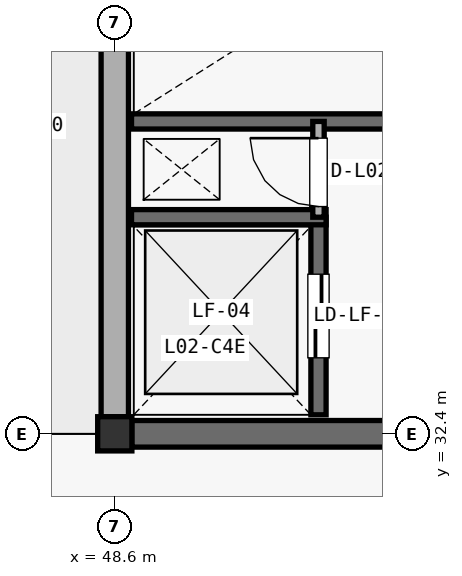
"""IFC4 building model, lengths in metres.
Left out: names, types, materials, properties, quantities, classifications, styles, units other than length and angle.
Written with IfcOpenShell. Run it as: python <this file> out.ifc"""

import sys

from ifc_helpers import new_model, si_unit, direction, frame, frame_2d, origin, origin_2d, place, context, subcontext, project, spatial, rectangle, extrude, element, fill, save


model = new_model("IFC4")
c1 = context("Model", 3, precision=1e-05, world=origin(), true_north=direction((0.0, 1.0)))
c2 = subcontext(c1, "Body", "Model", "MODEL_VIEW")
j1 = project(units=[si_unit("LENGTHUNIT", "METRE"), si_unit("PLANEANGLEUNIT", "RADIAN")], contexts=[c1])
p1 = place(None, origin())
s1 = spatial("IfcSite", under=j1, at=p1, CompositionType="ELEMENT")
p2 = place(p1, origin())
s2 = spatial("IfcBuilding", under=s1, at=p2, CompositionType="ELEMENT")
p3 = place(p2, frame((0.0, 0.0, 9.69)))
s3 = spatial("IfcBuildingStorey", under=s2, at=p3, CompositionType="ELEMENT", Elevation=9.69)
p4 = place(p3, frame((48.6, 32.4, 0.0), z_axis=(0.0, 0.0, 1.0), x_axis=(1.0, 0.0, 0.0)))
e1 = element("IfcColumn", 1, at=p4, inside=s3, PredefinedType="COLUMN", context=c2, shape_type="SweptSolid", body=[
    extrude(rectangle(XDim=0.45, YDim=0.45, at=origin_2d()), origin(), (0.0, 0.0, 1.0), 4.42),
])
p5 = place(p3, frame((48.6, 32.623, 0.0), z_axis=(0.0, 0.0, 1.0), x_axis=(0.0, 1.0, 0.0)))
e2 = element("IfcWall", 2, at=p5, inside=s3, PredefinedType="STANDARD", context=c2, shape_type="SweptSolid", body=[
    extrude(rectangle(XDim=7.654, YDim=0.36, at=frame_2d((3.827, 0.0))), origin(), (0.0, 0.0, 1.0), 3.682),
])
p6 = place(p3, frame((48.823, 32.4, 0.0), z_axis=(0.0, 0.0, 1.0), x_axis=(1.0, 0.0, 0.0)))
e3 = element("IfcWall", 3, at=p6, inside=s3, PredefinedType="SHEAR", context=c2, shape_type="SweptSolid", body=[
    extrude(rectangle(XDim=7.654, YDim=0.35, at=frame_2d((3.827, 0.0))), origin(), (0.0, 0.0, 1.0), 4.142),
])
p7 = place(p6, frame((4.427, 0.0, 0.0)))
e4 = element("IfcOpeningElement", 4, at=p7, cuts=e3, PredefinedType="OPENING", context=c2, shape_type="SweptSolid", body=[
    extrude(rectangle(XDim=1.2, YDim=2.2, at=frame_2d((0.6, 1.1))), frame((0.0, 0.185, 0.0), z_axis=(0.0, -1.0, 0.0), x_axis=(1.0, 0.0, 0.0)), (0.0, 0.0, 1.0), 0.37),
])
p8 = place(p3, frame((48.82, 36.51, 0.0), z_axis=(0.0, 0.0, 1.0), x_axis=(1.0, 0.0, 0.0)))
e5 = element("IfcWall", 5, at=p8, inside=s3, PredefinedType="SHEAR", context=c2, shape_type="SweptSolid", body=[
    extrude(rectangle(XDim=7.66, YDim=0.2, at=frame_2d((3.83, 0.0))), origin(), (0.0, 0.0, 1.0), 4.142),
])
p9 = place(p8, frame((6.11, 0.0, 0.0)))
e6 = element("IfcOpeningElement", 6, at=p9, cuts=e5, PredefinedType="OPENING", context=c2, shape_type="SweptSolid", body=[
    extrude(rectangle(XDim=1.15, YDim=2.2, at=frame_2d((0.575, 1.1))), frame((0.0, 0.11, 0.0), z_axis=(0.0, -1.0, 0.0), x_axis=(1.0, 0.0, 0.0)), (0.0, 0.0, 1.0), 0.22),
])
p10 = place(p3, frame((51.28, 32.65, 0.0), z_axis=(0.0, 0.0, 1.0), x_axis=(0.0, 1.0, 0.0)))
e7 = element("IfcWall", 7, at=p10, inside=s3, PredefinedType="SHEAR", context=c2, shape_type="SweptSolid", body=[
    extrude(rectangle(XDim=2.6, YDim=0.2, at=frame_2d((1.3, 0.0))), origin(), (0.0, 0.0, 1.0), 4.142),
])
p11 = place(p10, frame((0.75, 0.0, 0.0)))
e8 = element("IfcOpeningElement", 8, at=p11, cuts=e7, PredefinedType="OPENING", context=c2, shape_type="SweptSolid", body=[
    extrude(rectangle(XDim=1.1, YDim=2.2, at=frame_2d((0.55, 1.1))), frame((0.0, 0.11, 0.0), z_axis=(0.0, -1.0, 0.0), x_axis=(1.0, 0.0, 0.0)), (0.0, 0.0, 1.0), 0.22),
])
p12 = place(p3, frame((48.82, 35.25, 0.0), z_axis=(0.0, 0.0, 1.0), x_axis=(1.0, 0.0, 0.0)))
e9 = element("IfcWall", 9, at=p12, inside=s3, PredefinedType="SHEAR", context=c2, shape_type="SweptSolid", body=[
    extrude(rectangle(XDim=2.56, YDim=0.2, at=frame_2d((1.28, 0.0))), origin(), (0.0, 0.0, 1.0), 4.142),
])
p13 = place(p3, frame((51.28, 35.25, 0.0), z_axis=(0.0, 0.0, 1.0), x_axis=(0.0, 1.0, 0.0)))
e10 = element("IfcWall", 10, at=p13, inside=s3, PredefinedType="PARTITIONING", context=c2, shape_type="SweptSolid", body=[
    extrude(rectangle(XDim=1.26, YDim=0.15, at=frame_2d((0.63, 0.0))), origin(), (0.0, 0.0, 1.0), 4.142),
])
p14 = place(p13, frame((0.14, 0.0, 0.0)))
e11 = element("IfcOpeningElement", 11, at=p14, cuts=e10, PredefinedType="OPENING", context=c2, shape_type="SweptSolid", body=[
    extrude(rectangle(XDim=0.9, YDim=2.15, at=frame_2d((0.45, 1.075))), frame((0.0, 0.085, 0.0), z_axis=(0.0, -1.0, 0.0), x_axis=(1.0, 0.0, 0.0)), (0.0, 0.0, 1.0), 0.17),
])
p15 = place(p11, origin())
e12 = element("IfcDoor", 12, at=p15, inside=s3, OperationType="SLIDING_TO_LEFT", PredefinedType="DOOR", context=c2, shape_type="SweptSolid", body=[
    extrude(rectangle(XDim=1.1, YDim=2.2, at=frame_2d((0.55, 1.1))), frame((0.0, 0.025, 0.0), z_axis=(0.0, -1.0, 0.0), x_axis=(1.0, 0.0, 0.0)), (0.0, 0.0, 1.0), 0.05),
])
fill(e8, e12)
p16 = place(p14, origin())
e13 = element("IfcDoor", 13, at=p16, inside=s3, OperationType="SINGLE_SWING_RIGHT", PredefinedType="DOOR", context=c2, shape_type="SweptSolid", body=[
    extrude(rectangle(XDim=0.9, YDim=2.15, at=frame_2d((0.45, 1.075))), frame((0.0, 0.025, 0.0), z_axis=(0.0, -1.0, 0.0), x_axis=(1.0, 0.0, 0.0)), (0.0, 0.0, 1.0), 0.05),
])
fill(e11, e13)
save(model, sys.argv[1])
